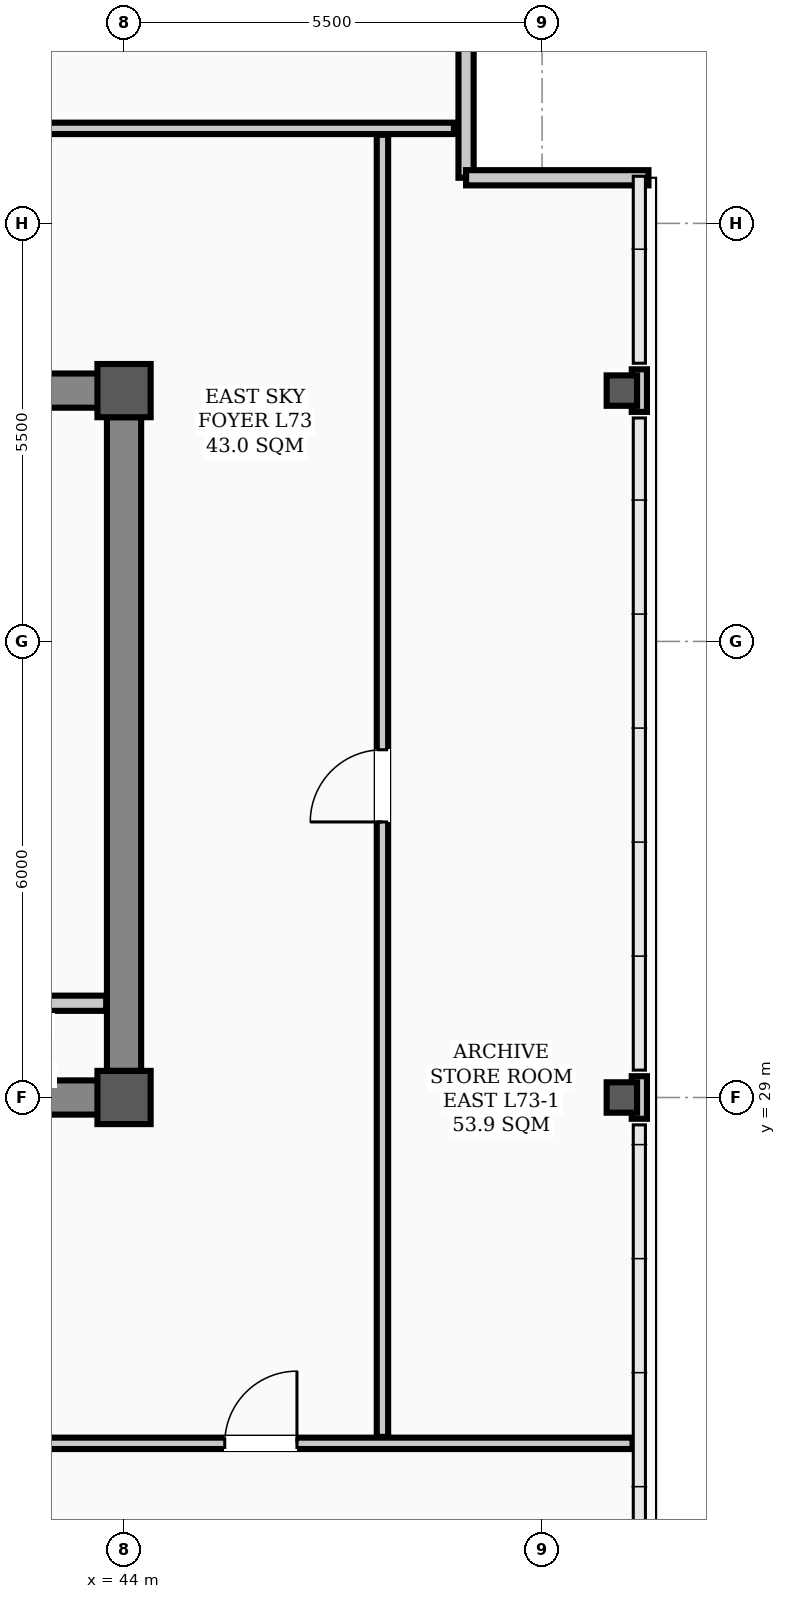
"""IFC4 building model, lengths in metres.
Left out: names, types, materials, properties, quantities, classifications, styles, units other than length and angle.
Written with IfcOpenShell. Run it as: python <this file> out.ifc"""

import sys

from ifc_helpers import new_model, si_unit, direction, frame, frame_2d, origin, origin_2d, place, context, subcontext, project, spatial, rectangle, hollow_rectangle, extrude, element, fill, save


model = new_model("IFC4")
c1 = context("Model", 3, precision=1e-05, world=origin(), true_north=direction((0.0, 1.0)))
c2 = subcontext(c1, "Body", "Model", "MODEL_VIEW")
j1 = project(units=[si_unit("LENGTHUNIT", "METRE"), si_unit("PLANEANGLEUNIT", "RADIAN")], contexts=[c1])
p1 = place(None, origin())
s1 = spatial("IfcSite", under=j1, at=p1, CompositionType="ELEMENT")
p2 = place(p1, origin())
s2 = spatial("IfcBuilding", under=s1, at=p2, CompositionType="ELEMENT")
p3 = place(p2, frame((0.0, 0.0, 293.0)))
s3 = spatial("IfcBuildingStorey", under=s2, at=p3, CompositionType="ELEMENT", Elevation=293.0)
for number, where, z_axis, x_axis in (
    (1, (44.0, 29.0, 0.0), (0.0, 0.0, 1.0), (1.0, 0.0, 0.0)),
    (2, (44.0, 38.3, 0.0), (0.0, 0.0, 1.0), (1.0, 0.0, 0.0)),
):
    element("IfcColumn", number, at=place(p3, frame(where, z_axis=z_axis, x_axis=x_axis)), inside=s3, PredefinedType="COLUMN", context=c2, shape_type="SweptSolid", body=[
        extrude(hollow_rectangle(XDim=0.7, YDim=0.7, WallThickness=0.028, InnerFilletRadius=0.014, OuterFilletRadius=0.042, at=origin_2d()), origin(), (0.0, 0.0, 1.0), 3.9),
    ])
for number, where, z_axis, x_axis in (
    (3, (50.55, 29.0, 0.0), (0.0, 0.0, 1.0), (1.0, 0.0, 0.0)),
    (4, (50.55, 38.3, 0.0), (0.0, 0.0, 1.0), (1.0, 0.0, 0.0)),
):
    element("IfcColumn", number, at=place(p3, frame(where, z_axis=z_axis, x_axis=x_axis)), inside=s3, PredefinedType="COLUMN", context=c2, shape_type="SweptSolid", body=[
        extrude(hollow_rectangle(XDim=0.4, YDim=0.4, WallThickness=0.02, InnerFilletRadius=0.02, OuterFilletRadius=0.04, at=origin_2d()), origin(), (0.0, 0.0, 1.0), 3.9),
    ])
for number, where, z_axis, x_axis in (
    (5, (50.78, 28.72, 0.0), (0.0, 0.0, 1.0), (0.0, 1.0, 0.0)),
    (6, (50.78, 38.02, 0.0), (0.0, 0.0, 1.0), (0.0, 1.0, 0.0)),
):
    element("IfcWall", number, at=place(p3, frame(where, z_axis=z_axis, x_axis=x_axis)), inside=s3, PredefinedType="PARAPET", context=c2, shape_type="SweptSolid", body=[
        extrude(rectangle(XDim=0.56, YDim=0.2, at=frame_2d((0.28, 0.0))), origin(), (0.0, 0.0, 1.0), 1.2),
    ])
for number, where, z_axis, x_axis in (
    (7, (48.5, 43.5, 0.0), (0.0, 0.0, 1.0), (0.0, -1.0, 0.0)),
    (8, (48.5, 41.1, 0.0), (0.0, 0.0, 1.0), (1.0, 0.0, 0.0)),
):
    element("IfcWall", number, at=place(p3, frame(where, z_axis=z_axis, x_axis=x_axis)), inside=s3, PredefinedType="PARAPET", context=c2, shape_type="SweptSolid", body=[
        extrude(rectangle(XDim=2.4, YDim=0.2, at=frame_2d((1.2, 0.0))), origin(), (0.0, 0.0, 1.0), 1.2),
    ])
p4 = place(p3, frame((13.5, 29.0, 0.0), z_axis=(0.0, 0.0, 1.0), x_axis=(1.0, 0.0, 0.0)))
e9 = element("IfcWall", 9, at=p4, inside=s3, PredefinedType="SHEAR", context=c2, shape_type="SweptSolid", body=[
    extrude(rectangle(XDim=30.5, YDim=0.45, at=frame_2d((15.25, 0.0))), origin(), (0.0, 0.0, 1.0), 3.72),
])
p5 = place(p4, frame((1.75, 0.0, 0.0)))
e10 = element("IfcOpeningElement", 10, at=p5, cuts=e9, PredefinedType="OPENING", context=c2, shape_type="SweptSolid", body=[
    extrude(rectangle(XDim=1.1, YDim=2.08, at=frame_2d((0.55, 1.04))), frame((0.0, 0.235, 0.0), z_axis=(0.0, -1.0, 0.0), x_axis=(1.0, 0.0, 0.0)), (0.0, 0.0, 1.0), 0.47),
])
p6 = place(p4, frame((26.7, 0.0, 0.0)))
e11 = element("IfcOpeningElement", 11, at=p6, cuts=e9, PredefinedType="OPENING", context=c2, shape_type="SweptSolid", body=[
    extrude(rectangle(XDim=1.1, YDim=2.08, at=frame_2d((0.55, 1.04))), frame((0.0, 0.235, 0.0), z_axis=(0.0, -1.0, 0.0), x_axis=(1.0, 0.0, 0.0)), (0.0, 0.0, 1.0), 0.47),
])
p7 = place(p4, frame((6.8, 0.0, 0.0)))
e12 = element("IfcOpeningElement", 12, at=p7, cuts=e9, PredefinedType="OPENING", context=c2, shape_type="SweptSolid", body=[
    extrude(rectangle(XDim=1.1, YDim=2.08, at=frame_2d((0.55, 1.04))), frame((0.0, 0.235, 0.0), z_axis=(0.0, -1.0, 0.0), x_axis=(1.0, 0.0, 0.0)), (0.0, 0.0, 1.0), 0.47),
])
p8 = place(p4, frame((13.2, 0.0, 0.0)))
e13 = element("IfcOpeningElement", 13, at=p8, cuts=e9, PredefinedType="OPENING", context=c2, shape_type="SweptSolid", body=[
    extrude(rectangle(XDim=1.6, YDim=2.08, at=frame_2d((0.8, 1.04))), frame((0.0, 0.235, 0.0), z_axis=(0.0, -1.0, 0.0), x_axis=(1.0, 0.0, 0.0)), (0.0, 0.0, 1.0), 0.47),
])
p9 = place(p4, frame((19.5, 0.0, 0.0)))
e14 = element("IfcOpeningElement", 14, at=p9, cuts=e9, PredefinedType="OPENING", context=c2, shape_type="SweptSolid", body=[
    extrude(rectangle(XDim=0.9, YDim=2.08, at=frame_2d((0.45, 1.04))), frame((0.0, 0.235, 0.0), z_axis=(0.0, -1.0, 0.0), x_axis=(1.0, 0.0, 0.0)), (0.0, 0.0, 1.0), 0.47),
])
p10 = place(p4, frame((21.55, 0.0, 0.0)))
e15 = element("IfcOpeningElement", 15, at=p10, cuts=e9, PredefinedType="OPENING", context=c2, shape_type="SweptSolid", body=[
    extrude(rectangle(XDim=0.9, YDim=2.08, at=frame_2d((0.45, 1.04))), frame((0.0, 0.235, 0.0), z_axis=(0.0, -1.0, 0.0), x_axis=(1.0, 0.0, 0.0)), (0.0, 0.0, 1.0), 0.47),
])
p11 = place(p3, frame((13.5, 38.3, 0.0), z_axis=(0.0, 0.0, 1.0), x_axis=(1.0, 0.0, 0.0)))
e16 = element("IfcWall", 16, at=p11, inside=s3, PredefinedType="SHEAR", context=c2, shape_type="SweptSolid", body=[
    extrude(rectangle(XDim=30.5, YDim=0.45, at=frame_2d((15.25, 0.0))), origin(), (0.0, 0.0, 1.0), 3.72),
])
p12 = place(p3, frame((44.0, 29.35, 0.0), z_axis=(0.0, 0.0, 1.0), x_axis=(0.0, 1.0, 0.0)))
e17 = element("IfcWall", 17, at=p12, inside=s3, PredefinedType="SHEAR", context=c2, shape_type="SweptSolid", body=[
    extrude(rectangle(XDim=8.6, YDim=0.45, at=frame_2d((4.3, 0.0))), origin(), (0.0, 0.0, 1.0), 3.72),
])
p13 = place(p3, frame((42.4, 30.24, 0.0), z_axis=(0.0, 0.0, 1.0), x_axis=(1.0, 0.0, 0.0)))
e18 = element("IfcWall", 18, at=p13, inside=s3, PredefinedType="STANDARD", context=c2, shape_type="SweptSolid", body=[
    extrude(rectangle(XDim=1.365, YDim=0.2, at=frame_2d((0.683, 0.0))), origin(), (0.0, 0.0, 1.0), 3.2),
])
p14 = place(p3, frame((12.31, 24.45, 0.0), z_axis=(0.0, 0.0, 1.0), x_axis=(1.0, 0.0, 0.0)))
e19 = element("IfcWall", 19, at=p14, inside=s3, PredefinedType="PARTITIONING", context=c2, shape_type="SweptSolid", body=[
    extrude(rectangle(XDim=38.38, YDim=0.15, at=frame_2d((19.19, 0.0))), origin(), (0.0, 0.0, 1.0), 3.2),
])
p15 = place(p14, frame((3.57, 0.0, 0.0)))
e20 = element("IfcOpeningElement", 20, at=p15, cuts=e19, PredefinedType="OPENING", context=c2, shape_type="SweptSolid", body=[
    extrude(rectangle(XDim=0.95, YDim=2.08, at=frame_2d((0.475, 1.04))), frame((0.0, 0.085, 0.0), z_axis=(0.0, -1.0, 0.0), x_axis=(1.0, 0.0, 0.0)), (0.0, 0.0, 1.0), 0.17),
])
p16 = place(p14, frame((8.915, 0.0, 0.0)))
e21 = element("IfcOpeningElement", 21, at=p16, cuts=e19, PredefinedType="OPENING", context=c2, shape_type="SweptSolid", body=[
    extrude(rectangle(XDim=0.95, YDim=2.08, at=frame_2d((0.475, 1.04))), frame((0.0, 0.085, 0.0), z_axis=(0.0, -1.0, 0.0), x_axis=(1.0, 0.0, 0.0)), (0.0, 0.0, 1.0), 0.17),
])
p17 = place(p14, frame((15.415, 0.0, 0.0)))
e22 = element("IfcOpeningElement", 22, at=p17, cuts=e19, PredefinedType="OPENING", context=c2, shape_type="SweptSolid", body=[
    extrude(rectangle(XDim=0.95, YDim=2.08, at=frame_2d((0.475, 1.04))), frame((0.0, 0.085, 0.0), z_axis=(0.0, -1.0, 0.0), x_axis=(1.0, 0.0, 0.0)), (0.0, 0.0, 1.0), 0.17),
])
p18 = place(p14, frame((22.015, 0.0, 0.0)))
e23 = element("IfcOpeningElement", 23, at=p18, cuts=e19, PredefinedType="OPENING", context=c2, shape_type="SweptSolid", body=[
    extrude(rectangle(XDim=0.95, YDim=2.08, at=frame_2d((0.475, 1.04))), frame((0.0, 0.085, 0.0), z_axis=(0.0, -1.0, 0.0), x_axis=(1.0, 0.0, 0.0)), (0.0, 0.0, 1.0), 0.17),
])
p19 = place(p14, frame((27.415, 0.0, 0.0)))
e24 = element("IfcOpeningElement", 24, at=p19, cuts=e19, PredefinedType="OPENING", context=c2, shape_type="SweptSolid", body=[
    extrude(rectangle(XDim=0.95, YDim=2.08, at=frame_2d((0.475, 1.04))), frame((0.0, 0.085, 0.0), z_axis=(0.0, -1.0, 0.0), x_axis=(1.0, 0.0, 0.0)), (0.0, 0.0, 1.0), 0.17),
])
p20 = place(p14, frame((33.015, 0.0, 0.0)))
e25 = element("IfcOpeningElement", 25, at=p20, cuts=e19, PredefinedType="OPENING", context=c2, shape_type="SweptSolid", body=[
    extrude(rectangle(XDim=0.95, YDim=2.08, at=frame_2d((0.475, 1.04))), frame((0.0, 0.085, 0.0), z_axis=(0.0, -1.0, 0.0), x_axis=(1.0, 0.0, 0.0)), (0.0, 0.0, 1.0), 0.17),
])
p21 = place(p3, frame((14.66, 41.75, 0.0), z_axis=(0.0, 0.0, 1.0), x_axis=(1.0, 0.0, 0.0)))
e26 = element("IfcWall", 26, at=p21, inside=s3, PredefinedType="PARTITIONING", context=c2, shape_type="SweptSolid", body=[
    extrude(rectangle(XDim=33.68, YDim=0.15, at=frame_2d((16.84, 0.0))), origin(), (0.0, 0.0, 1.0), 3.2),
])
p22 = place(p3, frame((47.4, 24.535, 0.0), z_axis=(0.0, 0.0, 1.0), x_axis=(0.0, 1.0, 0.0)))
e27 = element("IfcWall", 27, at=p22, inside=s3, PredefinedType="PARTITIONING", context=c2, shape_type="SweptSolid", body=[
    extrude(rectangle(XDim=17.13, YDim=0.15, at=frame_2d((8.565, 0.0))), origin(), (0.0, 0.0, 1.0), 3.1),
])
p23 = place(p22, frame((8.09, 0.0, 0.0)))
e28 = element("IfcOpeningElement", 28, at=p23, cuts=e27, PredefinedType="OPENING", context=c2, shape_type="SweptSolid", body=[
    extrude(rectangle(XDim=0.95, YDim=2.08, at=frame_2d((0.475, 1.04))), frame((0.0, 0.085, 0.0), z_axis=(0.0, -1.0, 0.0), x_axis=(1.0, 0.0, 0.0)), (0.0, 0.0, 1.0), 0.17),
])
p24 = place(p20, origin())
e29 = element("IfcDoor", 29, at=p24, inside=s3, OperationType="SINGLE_SWING_RIGHT", PredefinedType="DOOR", context=c2, shape_type="SweptSolid", body=[
    extrude(rectangle(XDim=0.95, YDim=2.08, at=frame_2d((0.475, 1.04))), frame((0.0, 0.025, 0.0), z_axis=(0.0, -1.0, 0.0), x_axis=(1.0, 0.0, 0.0)), (0.0, 0.0, 1.0), 0.05),
])
fill(e25, e29)
p25 = place(p23, origin())
e30 = element("IfcDoor", 30, at=p25, inside=s3, OperationType="SINGLE_SWING_LEFT", PredefinedType="DOOR", context=c2, shape_type="SweptSolid", body=[
    extrude(rectangle(XDim=0.95, YDim=2.08, at=frame_2d((0.475, 1.04))), frame((0.0, 0.025, 0.0), z_axis=(0.0, -1.0, 0.0), x_axis=(1.0, 0.0, 0.0)), (0.0, 0.0, 1.0), 0.05),
])
fill(e28, e30)
save(model, sys.argv[1])
